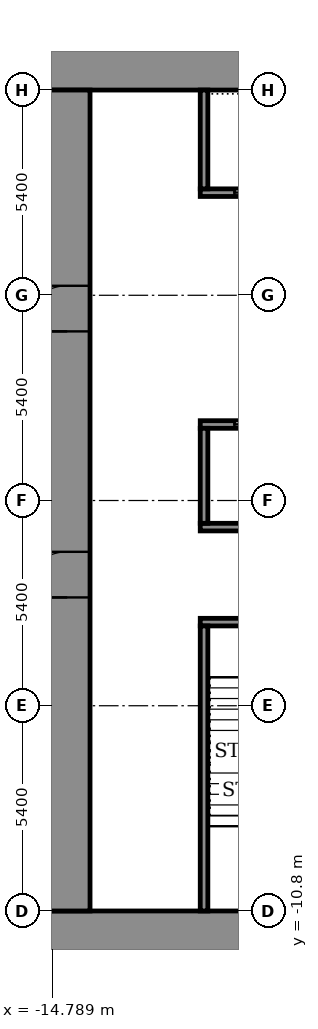
"""IFC4 building model, lengths in metres.
Left out: names, types, materials, properties, quantities, classifications, styles, units other than length and angle.
Written with IfcOpenShell. Run it as: python <this file> out.ifc"""

import sys

from ifc_helpers import new_model, si_unit, direction, frame, frame_2d, origin, place, context, subcontext, project, spatial, rectangle, extrude, element, fill, save


model = new_model("IFC4")
c1 = context("Model", 3, precision=1e-05, world=origin(), true_north=direction((0.0, 1.0)))
c2 = subcontext(c1, "Body", "Model", "MODEL_VIEW")
j1 = project(units=[si_unit("LENGTHUNIT", "METRE"), si_unit("PLANEANGLEUNIT", "RADIAN")], contexts=[c1])
p1 = place(None, origin())
s1 = spatial("IfcSite", under=j1, at=p1, CompositionType="ELEMENT")
p2 = place(p1, origin())
s2 = spatial("IfcBuilding", under=s1, at=p2, CompositionType="ELEMENT")
p3 = place(p2, frame((0.0, 0.0, 6.0)))
s3 = spatial("IfcBuildingStorey", under=s2, at=p3, CompositionType="ELEMENT", Elevation=6.0)
for number, where, z_axis, x_axis in (
    (1, (-15.0, -11.4, 0.0), (0.0, 0.0, 1.0), (1.0, 0.0, 0.0)),
    (2, (-15.0, 11.4, 0.0), (0.0, 0.0, 1.0), (1.0, 0.0, 0.0)),
):
    element("IfcWall", number, at=place(p3, frame(where, z_axis=z_axis, x_axis=x_axis)), inside=s3, PredefinedType="SHEAR", context=c2, shape_type="SweptSolid", body=[
        extrude(rectangle(XDim=30.0, YDim=1.2, at=frame_2d((15.0, 0.0))), origin(), (0.0, 0.0, 1.0), 5.0),
    ])
p4 = place(p3, frame((-14.4, -10.8, 0.0), z_axis=(0.0, 0.0, 1.0), x_axis=(0.0, 1.0, 0.0)))
e3 = element("IfcWall", 3, at=p4, inside=s3, PredefinedType="SHEAR", context=c2, shape_type="SweptSolid", body=[
    extrude(rectangle(XDim=21.6, YDim=1.2, at=frame_2d((10.8, 0.0))), origin(), (0.0, 0.0, 1.0), 5.0),
])
p5 = place(p4, frame((8.25, 0.0, 0.0)))
e4 = element("IfcOpeningElement", 4, at=p5, cuts=e3, PredefinedType="OPENING", context=c2, shape_type="SweptSolid", body=[
    extrude(rectangle(XDim=1.2, YDim=2.1, at=frame_2d((0.6, 1.05))), frame((0.0, 0.61, 0.0), z_axis=(0.0, -1.0, 0.0), x_axis=(1.0, 0.0, 0.0)), (0.0, 0.0, 1.0), 1.22),
])
p6 = place(p4, frame((15.25, 0.0, 0.0)))
e5 = element("IfcOpeningElement", 5, at=p6, cuts=e3, PredefinedType="OPENING", context=c2, shape_type="SweptSolid", body=[
    extrude(rectangle(XDim=1.2, YDim=2.1, at=frame_2d((0.6, 1.05))), frame((0.0, 0.61, 0.0), z_axis=(0.0, -1.0, 0.0), x_axis=(1.0, 0.0, 0.0)), (0.0, 0.0, 1.0), 1.22),
])
p7 = place(p3, frame((-10.9, -3.2, 0.0), z_axis=(0.0, 0.0, 1.0), x_axis=(1.0, 0.0, 0.0)))
e6 = element("IfcWall", 6, at=p7, inside=s3, PredefinedType="SHEAR", context=c2, shape_type="SweptSolid", body=[
    extrude(rectangle(XDim=21.8, YDim=0.2, at=frame_2d((10.9, 0.0))), origin(), (0.0, 0.0, 1.0), 4.45),
])
p8 = place(p7, frame((1.075, 0.0, 0.0)))
e7 = element("IfcOpeningElement", 7, at=p8, cuts=e6, PredefinedType="OPENING", context=c2, shape_type="SweptSolid", body=[
    extrude(rectangle(XDim=1.1, YDim=2.1, at=frame_2d((0.55, 1.05))), frame((0.0, 0.11, 0.0), z_axis=(0.0, -1.0, 0.0), x_axis=(1.0, 0.0, 0.0)), (0.0, 0.0, 1.0), 0.22),
])
p9 = place(p7, frame((10.325, 0.0, 0.0)))
e8 = element("IfcOpeningElement", 8, at=p9, cuts=e6, PredefinedType="OPENING", context=c2, shape_type="SweptSolid", body=[
    extrude(rectangle(XDim=1.1, YDim=2.1, at=frame_2d((0.55, 1.05))), frame((0.0, 0.11, 0.0), z_axis=(0.0, -1.0, 0.0), x_axis=(1.0, 0.0, 0.0)), (0.0, 0.0, 1.0), 0.22),
])
p10 = place(p7, frame((19.625, 0.0, 0.0)))
e9 = element("IfcOpeningElement", 9, at=p10, cuts=e6, PredefinedType="OPENING", context=c2, shape_type="SweptSolid", body=[
    extrude(rectangle(XDim=1.1, YDim=2.1, at=frame_2d((0.55, 1.05))), frame((0.0, 0.11, 0.0), z_axis=(0.0, -1.0, 0.0), x_axis=(1.0, 0.0, 0.0)), (0.0, 0.0, 1.0), 0.22),
])
p11 = place(p7, frame((5.7, 0.0, 0.0)))
e10 = element("IfcOpeningElement", 10, at=p11, cuts=e6, PredefinedType="OPENING", context=c2, shape_type="SweptSolid", body=[
    extrude(rectangle(XDim=1.1, YDim=2.1, at=frame_2d((0.55, 1.05))), frame((0.0, 0.11, 0.0), z_axis=(0.0, -1.0, 0.0), x_axis=(1.0, 0.0, 0.0)), (0.0, 0.0, 1.0), 0.22),
])
p12 = place(p7, frame((14.975, 0.0, 0.0)))
e11 = element("IfcOpeningElement", 11, at=p12, cuts=e6, PredefinedType="OPENING", context=c2, shape_type="SweptSolid", body=[
    extrude(rectangle(XDim=1.1, YDim=2.1, at=frame_2d((0.55, 1.05))), frame((0.0, 0.11, 0.0), z_axis=(0.0, -1.0, 0.0), x_axis=(1.0, 0.0, 0.0)), (0.0, 0.0, 1.0), 0.22),
])
p13 = place(p3, frame((-10.9, -0.7, 0.0), z_axis=(0.0, 0.0, 1.0), x_axis=(1.0, 0.0, 0.0)))
e12 = element("IfcWall", 12, at=p13, inside=s3, PredefinedType="SHEAR", context=c2, shape_type="SweptSolid", body=[
    extrude(rectangle(XDim=21.8, YDim=0.2, at=frame_2d((10.9, 0.0))), origin(), (0.0, 0.0, 1.0), 4.45),
])
p14 = place(p3, frame((-10.9, 2.0, 0.0), z_axis=(0.0, 0.0, 1.0), x_axis=(1.0, 0.0, 0.0)))
e13 = element("IfcWall", 13, at=p14, inside=s3, PredefinedType="SHEAR", context=c2, shape_type="SweptSolid", body=[
    extrude(rectangle(XDim=21.8, YDim=0.2, at=frame_2d((10.9, 0.0))), origin(), (0.0, 0.0, 1.0), 4.45),
])
p15 = place(p14, frame((0.9, 0.0, 0.0)))
e14 = element("IfcOpeningElement", 14, at=p15, cuts=e13, PredefinedType="OPENING", context=c2, shape_type="SweptSolid", body=[
    extrude(rectangle(XDim=1.1, YDim=2.1, at=frame_2d((0.55, 1.05))), frame((0.0, 0.11, 0.0), z_axis=(0.0, -1.0, 0.0), x_axis=(1.0, 0.0, 0.0)), (0.0, 0.0, 1.0), 0.22),
])
p16 = place(p14, frame((3.6, 0.0, 0.0)))
e15 = element("IfcOpeningElement", 15, at=p16, cuts=e13, PredefinedType="OPENING", context=c2, shape_type="SweptSolid", body=[
    extrude(rectangle(XDim=1.1, YDim=2.1, at=frame_2d((0.55, 1.05))), frame((0.0, 0.11, 0.0), z_axis=(0.0, -1.0, 0.0), x_axis=(1.0, 0.0, 0.0)), (0.0, 0.0, 1.0), 0.22),
])
p17 = place(p14, frame((6.3, 0.0, 0.0)))
e16 = element("IfcOpeningElement", 16, at=p17, cuts=e13, PredefinedType="OPENING", context=c2, shape_type="SweptSolid", body=[
    extrude(rectangle(XDim=1.1, YDim=2.1, at=frame_2d((0.55, 1.05))), frame((0.0, 0.11, 0.0), z_axis=(0.0, -1.0, 0.0), x_axis=(1.0, 0.0, 0.0)), (0.0, 0.0, 1.0), 0.22),
])
p18 = place(p14, frame((9.0, 0.0, 0.0)))
e17 = element("IfcOpeningElement", 17, at=p18, cuts=e13, PredefinedType="OPENING", context=c2, shape_type="SweptSolid", body=[
    extrude(rectangle(XDim=1.1, YDim=2.1, at=frame_2d((0.55, 1.05))), frame((0.0, 0.11, 0.0), z_axis=(0.0, -1.0, 0.0), x_axis=(1.0, 0.0, 0.0)), (0.0, 0.0, 1.0), 0.22),
])
p19 = place(p14, frame((11.7, 0.0, 0.0)))
e18 = element("IfcOpeningElement", 18, at=p19, cuts=e13, PredefinedType="OPENING", context=c2, shape_type="SweptSolid", body=[
    extrude(rectangle(XDim=1.1, YDim=2.1, at=frame_2d((0.55, 1.05))), frame((0.0, 0.11, 0.0), z_axis=(0.0, -1.0, 0.0), x_axis=(1.0, 0.0, 0.0)), (0.0, 0.0, 1.0), 0.22),
])
p20 = place(p14, frame((14.5, 0.0, 0.0)))
e19 = element("IfcOpeningElement", 19, at=p20, cuts=e13, PredefinedType="OPENING", context=c2, shape_type="SweptSolid", body=[
    extrude(rectangle(XDim=0.9, YDim=2.1, at=frame_2d((0.45, 1.05))), frame((0.0, 0.11, 0.0), z_axis=(0.0, -1.0, 0.0), x_axis=(1.0, 0.0, 0.0)), (0.0, 0.0, 1.0), 0.22),
])
p21 = place(p14, frame((18.55, 0.0, 0.0)))
e20 = element("IfcOpeningElement", 20, at=p21, cuts=e13, PredefinedType="OPENING", context=c2, shape_type="SweptSolid", body=[
    extrude(rectangle(XDim=0.9, YDim=2.1, at=frame_2d((0.45, 1.05))), frame((0.0, 0.11, 0.0), z_axis=(0.0, -1.0, 0.0), x_axis=(1.0, 0.0, 0.0)), (0.0, 0.0, 1.0), 0.22),
])
p22 = place(p3, frame((-10.9, 8.1, 0.0), z_axis=(0.0, 0.0, 1.0), x_axis=(1.0, 0.0, 0.0)))
e21 = element("IfcWall", 21, at=p22, inside=s3, PredefinedType="SHEAR", context=c2, shape_type="SweptSolid", body=[
    extrude(rectangle(XDim=21.8, YDim=0.2, at=frame_2d((10.9, 0.0))), origin(), (0.0, 0.0, 1.0), 4.45),
])
p23 = place(p22, frame((0.9, 0.0, 0.0)))
e22 = element("IfcOpeningElement", 22, at=p23, cuts=e21, PredefinedType="OPENING", context=c2, shape_type="SweptSolid", body=[
    extrude(rectangle(XDim=1.1, YDim=2.1, at=frame_2d((0.55, 1.05))), frame((0.0, 0.11, 0.0), z_axis=(0.0, -1.0, 0.0), x_axis=(1.0, 0.0, 0.0)), (0.0, 0.0, 1.0), 0.22),
])
p24 = place(p22, frame((3.6, 0.0, 0.0)))
e23 = element("IfcOpeningElement", 23, at=p24, cuts=e21, PredefinedType="OPENING", context=c2, shape_type="SweptSolid", body=[
    extrude(rectangle(XDim=1.1, YDim=2.1, at=frame_2d((0.55, 1.05))), frame((0.0, 0.11, 0.0), z_axis=(0.0, -1.0, 0.0), x_axis=(1.0, 0.0, 0.0)), (0.0, 0.0, 1.0), 0.22),
])
p25 = place(p22, frame((6.3, 0.0, 0.0)))
e24 = element("IfcOpeningElement", 24, at=p25, cuts=e21, PredefinedType="OPENING", context=c2, shape_type="SweptSolid", body=[
    extrude(rectangle(XDim=1.1, YDim=2.1, at=frame_2d((0.55, 1.05))), frame((0.0, 0.11, 0.0), z_axis=(0.0, -1.0, 0.0), x_axis=(1.0, 0.0, 0.0)), (0.0, 0.0, 1.0), 0.22),
])
p26 = place(p22, frame((9.0, 0.0, 0.0)))
e25 = element("IfcOpeningElement", 25, at=p26, cuts=e21, PredefinedType="OPENING", context=c2, shape_type="SweptSolid", body=[
    extrude(rectangle(XDim=1.1, YDim=2.1, at=frame_2d((0.55, 1.05))), frame((0.0, 0.11, 0.0), z_axis=(0.0, -1.0, 0.0), x_axis=(1.0, 0.0, 0.0)), (0.0, 0.0, 1.0), 0.22),
])
p27 = place(p22, frame((11.7, 0.0, 0.0)))
e26 = element("IfcOpeningElement", 26, at=p27, cuts=e21, PredefinedType="OPENING", context=c2, shape_type="SweptSolid", body=[
    extrude(rectangle(XDim=1.1, YDim=2.1, at=frame_2d((0.55, 1.05))), frame((0.0, 0.11, 0.0), z_axis=(0.0, -1.0, 0.0), x_axis=(1.0, 0.0, 0.0)), (0.0, 0.0, 1.0), 0.22),
])
p28 = place(p22, frame((14.5, 0.0, 0.0)))
e27 = element("IfcOpeningElement", 27, at=p28, cuts=e21, PredefinedType="OPENING", context=c2, shape_type="SweptSolid", body=[
    extrude(rectangle(XDim=0.9, YDim=2.1, at=frame_2d((0.45, 1.05))), frame((0.0, 0.11, 0.0), z_axis=(0.0, -1.0, 0.0), x_axis=(1.0, 0.0, 0.0)), (0.0, 0.0, 1.0), 0.22),
])
p29 = place(p22, frame((18.55, 0.0, 0.0)))
e28 = element("IfcOpeningElement", 28, at=p29, cuts=e21, PredefinedType="OPENING", context=c2, shape_type="SweptSolid", body=[
    extrude(rectangle(XDim=0.9, YDim=2.1, at=frame_2d((0.45, 1.05))), frame((0.0, 0.11, 0.0), z_axis=(0.0, -1.0, 0.0), x_axis=(1.0, 0.0, 0.0)), (0.0, 0.0, 1.0), 0.22),
])
p30 = place(p3, frame((-10.8, -10.8, 0.0), z_axis=(0.0, 0.0, 1.0), x_axis=(0.0, 1.0, 0.0)))
e29 = element("IfcWall", 29, at=p30, inside=s3, PredefinedType="SHEAR", context=c2, shape_type="SweptSolid", body=[
    extrude(rectangle(XDim=7.5, YDim=0.2, at=frame_2d((3.75, 0.0))), origin(), (0.0, 0.0, 1.0), 4.45),
])
p31 = place(p3, frame((-10.8, -0.6, 0.0), z_axis=(0.0, 0.0, 1.0), x_axis=(0.0, 1.0, 0.0)))
e30 = element("IfcWall", 30, at=p31, inside=s3, PredefinedType="SHEAR", context=c2, shape_type="SweptSolid", body=[
    extrude(rectangle(XDim=2.5, YDim=0.2, at=frame_2d((1.25, 0.0))), origin(), (0.0, 0.0, 1.0), 4.45),
])
p32 = place(p3, frame((-10.8, 8.2, 0.0), z_axis=(0.0, 0.0, 1.0), x_axis=(0.0, 1.0, 0.0)))
e31 = element("IfcWall", 31, at=p32, inside=s3, PredefinedType="SHEAR", context=c2, shape_type="SweptSolid", body=[
    extrude(rectangle(XDim=2.6, YDim=0.2, at=frame_2d((1.3, 0.0))), origin(), (0.0, 0.0, 1.0), 4.45),
])
p33 = place(p5, origin())
e32 = element("IfcDoor", 32, at=p33, inside=s3, OperationType="DOUBLE_DOOR_SINGLE_SWING", PredefinedType="DOOR", context=c2, shape_type="SweptSolid", body=[
    extrude(rectangle(XDim=1.2, YDim=2.1, at=frame_2d((0.6, 1.05))), frame((0.0, 0.025, 0.0), z_axis=(0.0, -1.0, 0.0), x_axis=(1.0, 0.0, 0.0)), (0.0, 0.0, 1.0), 0.05),
])
fill(e4, e32)
p34 = place(p6, origin())
e33 = element("IfcDoor", 33, at=p34, inside=s3, OperationType="DOUBLE_DOOR_SINGLE_SWING", PredefinedType="DOOR", context=c2, shape_type="SweptSolid", body=[
    extrude(rectangle(XDim=1.2, YDim=2.1, at=frame_2d((0.6, 1.05))), frame((0.0, 0.025, 0.0), z_axis=(0.0, -1.0, 0.0), x_axis=(1.0, 0.0, 0.0)), (0.0, 0.0, 1.0), 0.05),
])
fill(e5, e33)
p35 = place(p15, origin())
e34 = element("IfcDoor", 34, at=p35, inside=s3, OperationType="SLIDING_TO_LEFT", PredefinedType="DOOR", context=c2, shape_type="SweptSolid", body=[
    extrude(rectangle(XDim=1.1, YDim=2.1, at=frame_2d((0.55, 1.05))), frame((0.0, 0.025, 0.0), z_axis=(0.0, -1.0, 0.0), x_axis=(1.0, 0.0, 0.0)), (0.0, 0.0, 1.0), 0.05),
])
fill(e14, e34)
p36 = place(p23, origin())
e35 = element("IfcDoor", 35, at=p36, inside=s3, OperationType="SLIDING_TO_LEFT", PredefinedType="DOOR", context=c2, shape_type="SweptSolid", body=[
    extrude(rectangle(XDim=1.1, YDim=2.1, at=frame_2d((0.55, 1.05))), frame((0.0, 0.025, 0.0), z_axis=(0.0, -1.0, 0.0), x_axis=(1.0, 0.0, 0.0)), (0.0, 0.0, 1.0), 0.05),
])
fill(e22, e35)
save(model, sys.argv[1])
